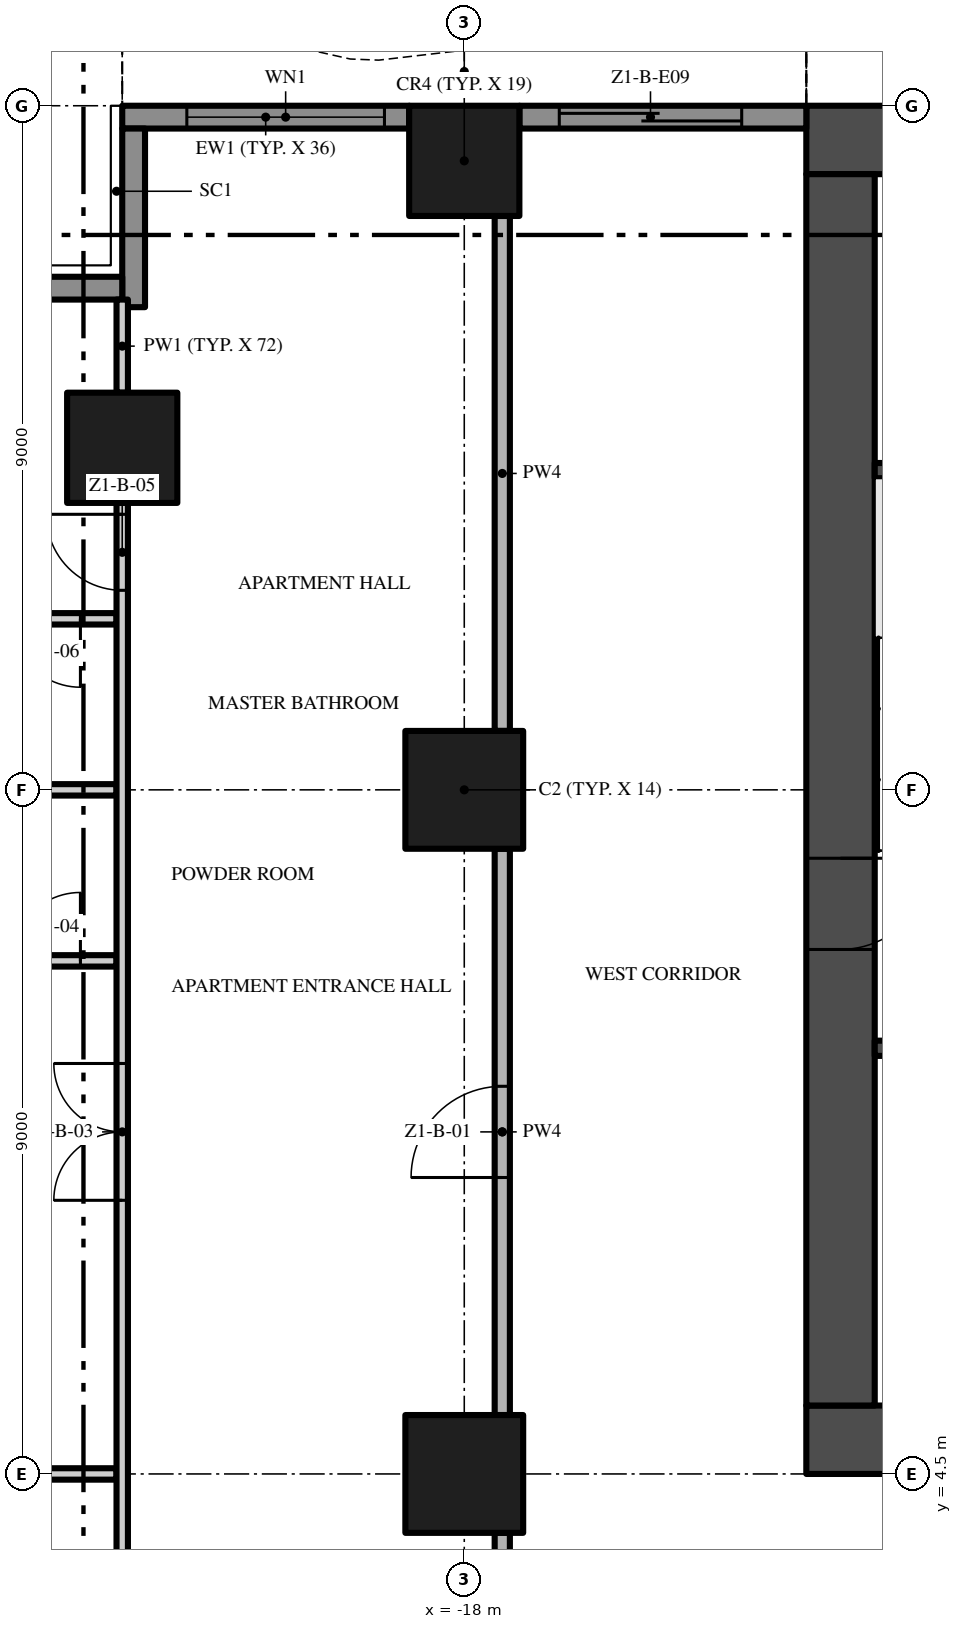
"""IFC4 building model, lengths in metres.
Left out: names, types, materials, properties, quantities, classifications, styles, units other than length and angle.
Written with IfcOpenShell. Run it as: python <this file> out.ifc"""

import sys

from ifc_helpers import new_model, si_unit, direction, frame, frame_2d, origin, origin_2d, place, context, subcontext, project, spatial, polyline, rectangle, outline, extrude, element, fill, save


model = new_model("IFC4")
c1 = context("Model", 3, precision=1e-05, world=origin(), true_north=direction((0.0, 1.0)))
c2 = subcontext(c1, "Body", "Model", "MODEL_VIEW")
j1 = project(units=[si_unit("LENGTHUNIT", "METRE"), si_unit("PLANEANGLEUNIT", "RADIAN")], contexts=[c1])
p1 = place(None, origin())
s1 = spatial("IfcSite", under=j1, at=p1, CompositionType="ELEMENT")
p2 = place(p1, origin())
s2 = spatial("IfcBuilding", under=s1, at=p2, CompositionType="ELEMENT")
p3 = place(p2, frame((0.0, 0.0, 26.4)))
s3 = spatial("IfcBuildingStorey", under=s2, at=p3, CompositionType="ELEMENT", Elevation=26.4)
p4 = place(p3, frame((-13.5, 4.95, -0.3), z_axis=(0.0, 0.0, 1.0), x_axis=(1.0, 0.0, 0.0)))
e1 = element("IfcWall", 1, at=p4, inside=s3, PredefinedType="SHEAR", context=c2, shape_type="SweptSolid", body=[
    extrude(rectangle(XDim=27.0, YDim=0.9, at=frame_2d((13.5, 0.0))), origin(), (0.0, 0.0, 1.0), 3.8),
])
p5 = place(p4, frame((12.0, 0.0, 0.3)))
e2 = element("IfcOpeningElement", 2, at=p5, cuts=e1, PredefinedType="OPENING", context=c2, shape_type="SweptSolid", body=[
    extrude(rectangle(XDim=3.0, YDim=2.4, at=frame_2d((1.5, 1.2))), frame((0.0, 0.46, 0.0), z_axis=(0.0, -1.0, 0.0), x_axis=(1.0, 0.0, 0.0)), (0.0, 0.0, 1.0), 0.92),
])
p6 = place(p4, frame((4.9, 0.0, 0.3)))
e3 = element("IfcOpeningElement", 3, at=p6, cuts=e1, PredefinedType="OPENING", context=c2, shape_type="SweptSolid", body=[
    extrude(rectangle(XDim=1.2, YDim=2.2, at=frame_2d((0.6, 1.1))), frame((0.0, 0.46, 0.0), z_axis=(0.0, -1.0, 0.0), x_axis=(1.0, 0.0, 0.0)), (0.0, 0.0, 1.0), 0.92),
])
p7 = place(p4, frame((20.75, 0.0, 0.3)))
e4 = element("IfcOpeningElement", 4, at=p7, cuts=e1, PredefinedType="OPENING", context=c2, shape_type="SweptSolid", body=[
    extrude(rectangle(XDim=1.5, YDim=2.2, at=frame_2d((0.75, 1.1))), frame((0.0, 0.46, 0.0), z_axis=(0.0, -1.0, 0.0), x_axis=(1.0, 0.0, 0.0)), (0.0, 0.0, 1.0), 0.92),
])
p8 = place(p4, frame((17.4, 0.0, 0.3)))
e5 = element("IfcOpeningElement", 5, at=p8, cuts=e1, PredefinedType="OPENING", context=c2, shape_type="SweptSolid", body=[
    extrude(rectangle(XDim=1.2, YDim=2.2, at=frame_2d((0.6, 1.1))), frame((0.0, 0.46, 0.0), z_axis=(0.0, -1.0, 0.0), x_axis=(1.0, 0.0, 0.0)), (0.0, 0.0, 1.0), 0.92),
])
p9 = place(p3, frame((13.5, 22.05, -0.3), z_axis=(0.0, 0.0, 1.0), x_axis=(-1.0, 0.0, 0.0)))
e6 = element("IfcWall", 6, at=p9, inside=s3, PredefinedType="SHEAR", context=c2, shape_type="SweptSolid", body=[
    extrude(rectangle(XDim=27.0, YDim=0.9, at=frame_2d((13.5, 0.0))), origin(), (0.0, 0.0, 1.0), 3.8),
])
p10 = place(p3, frame((-13.05, 21.6, -0.3), z_axis=(0.0, 0.0, 1.0), x_axis=(0.0, -1.0, 0.0)))
e7 = element("IfcWall", 7, at=p10, inside=s3, PredefinedType="SHEAR", context=c2, shape_type="SweptSolid", body=[
    extrude(rectangle(XDim=16.2, YDim=0.9, at=frame_2d((8.1, 0.0))), origin(), (0.0, 0.0, 1.0), 3.8),
])
p11 = place(p10, frame((9.0, 0.0, 0.3)))
e8 = element("IfcOpeningElement", 8, at=p11, cuts=e7, PredefinedType="OPENING", context=c2, shape_type="SweptSolid", body=[
    extrude(rectangle(XDim=1.2, YDim=2.2, at=frame_2d((0.6, 1.1))), frame((0.0, 0.46, 0.0), z_axis=(0.0, -1.0, 0.0), x_axis=(1.0, 0.0, 0.0)), (0.0, 0.0, 1.0), 0.92),
])
p12 = place(p3, frame((-18.0, 13.5, 0.0), z_axis=(0.0, 0.0, 1.0), x_axis=(1.0, 0.0, 0.0)))
e9 = element("IfcColumn", 9, at=p12, inside=s3, PredefinedType="COLUMN", context=c2, shape_type="SweptSolid", body=[
    extrude(rectangle(XDim=1.55, YDim=1.55, at=origin_2d()), origin(), (0.0, 0.0, 1.0), 3.5),
])
p13 = place(p3, frame((-18.0, 21.775, 0.0), z_axis=(0.0, 0.0, 1.0), x_axis=(1.0, 0.0, 0.0)))
e10 = element("IfcColumn", 10, at=p13, inside=s3, PredefinedType="COLUMN", context=c2, shape_type="SweptSolid", body=[
    extrude(rectangle(XDim=1.45, YDim=1.45, at=origin_2d()), origin(), (0.0, 0.0, 1.0), 3.5),
])
p14 = place(p3, frame((-18.0, 4.5, 0.0), z_axis=(0.0, 0.0, 1.0), x_axis=(1.0, 0.0, 0.0)))
e11 = element("IfcColumn", 11, at=p14, inside=s3, PredefinedType="COLUMN", context=c2, shape_type="SweptSolid", body=[
    extrude(rectangle(XDim=1.55, YDim=1.55, at=origin_2d()), origin(), (0.0, 0.0, 1.0), 3.5),
])
p15 = place(p3, frame((-22.5, 18.0, 0.0), z_axis=(0.0, 0.0, 1.0), x_axis=(1.0, 0.0, 0.0)))
e12 = element("IfcColumn", 12, at=p15, inside=s3, PredefinedType="COLUMN", context=c2, shape_type="SweptSolid", body=[
    extrude(rectangle(XDim=1.45, YDim=1.45, at=origin_2d()), origin(), (0.0, 0.0, 1.0), 3.5),
])
p16 = place(p3, frame((-17.275, 22.35, 0.0), z_axis=(0.0, 0.0, 1.0), x_axis=(1.0, 0.0, 0.0)))
e13 = element("IfcWall", 13, at=p16, inside=s3, PredefinedType="SOLIDWALL", context=c2, shape_type="SweptSolid", body=[
    extrude(rectangle(XDim=3.775, YDim=0.3, at=frame_2d((1.887, 0.0))), origin(), (0.0, 0.0, 1.0), 3.5),
])
p17 = place(p16, frame((0.525, 0.0, 0.0)))
e14 = element("IfcOpeningElement", 14, at=p17, cuts=e13, PredefinedType="OPENING", context=c2, shape_type="SweptSolid", body=[
    extrude(rectangle(XDim=2.4, YDim=2.4, at=frame_2d((1.2, 1.2))), frame((0.0, 0.16, 0.0), z_axis=(0.0, -1.0, 0.0), x_axis=(1.0, 0.0, 0.0)), (0.0, 0.0, 1.0), 0.32),
])
p18 = place(p3, frame((-22.5, 22.35, 0.0), z_axis=(0.0, 0.0, 1.0), x_axis=(1.0, 0.0, 0.0)))
e15 = element("IfcWall", 15, at=p18, inside=s3, PredefinedType="SOLIDWALL", context=c2, shape_type="SweptSolid", body=[
    extrude(rectangle(XDim=3.775, YDim=0.3, at=frame_2d((1.887, 0.0))), origin(), (0.0, 0.0, 1.0), 3.5),
])
p19 = place(p18, frame((0.85, 0.0, 0.45)))
e16 = element("IfcOpeningElement", 16, at=p19, cuts=e15, PredefinedType="OPENING", context=c2, shape_type="SweptSolid", body=[
    extrude(rectangle(XDim=2.6, YDim=2.65, at=frame_2d((1.3, 1.325))), frame((0.0, 0.16, 0.0), z_axis=(0.0, -1.0, 0.0), x_axis=(1.0, 0.0, 0.0)), (0.0, 0.0, 1.0), 0.32),
])
p20 = place(p3, frame((-22.35, 19.85, 0.0), z_axis=(0.0, 0.0, 1.0), x_axis=(0.0, 1.0, 0.0)))
e17 = element("IfcWall", 17, at=p20, inside=s3, PredefinedType="SOLIDWALL", context=c2, shape_type="SweptSolid", body=[
    extrude(rectangle(XDim=2.35, YDim=0.3, at=frame_2d((1.175, 0.0))), origin(), (0.0, 0.0, 1.0), 3.5),
])
p21 = place(p3, frame((-24.75, 20.1, 0.0), z_axis=(0.0, 0.0, 1.0), x_axis=(1.0, 0.0, 0.0)))
e18 = element("IfcWall", 18, at=p21, inside=s3, PredefinedType="SOLIDWALL", context=c2, shape_type="SweptSolid", body=[
    extrude(rectangle(XDim=2.25, YDim=0.3, at=frame_2d((1.125, 0.0))), origin(), (0.0, 0.0, 1.0), 3.5),
])
p22 = place(p3, origin())
e19 = element("IfcWall", 19, at=p22, inside=s3, PredefinedType="USERDEFINED", context=c2, shape_type="SweptSolid", body=[
    extrude(outline(polyline([(-13.5, 25.149), (-15.0, 24.488), (-16.5, 23.755), (-18.0, 23.231), (-19.125, 23.1), (-19.5, 23.115), (-21.0, 23.451), (-22.5, 24.112), (-22.601, 23.883), (-21.079, 23.213), (-19.533, 22.866), (-19.115, 22.849), (-17.944, 22.986), (-16.404, 23.524), (-14.895, 24.261), (-13.399, 24.92), (-13.5, 25.149)])), origin(), (0.0, 0.0, 1.0), 0.9),
])
for number, where, z_axis, x_axis in (
    (20, (-12.6, 10.1, 0.0), (0.0, 0.0, 1.0), (1.0, 0.0, 0.0)),
    (21, (-12.6, 17.7, 0.0), (0.0, 0.0, 1.0), (1.0, 0.0, 0.0)),
):
    element("IfcWall", number, at=place(p3, frame(where, z_axis=z_axis, x_axis=x_axis)), inside=s3, PredefinedType="SHEAR", context=c2, shape_type="SweptSolid", body=[
        extrude(rectangle(XDim=2.95, YDim=0.2, at=frame_2d((1.475, 0.0))), origin(), (0.0, 0.0, 1.0), 3.5),
    ])
p23 = place(p3, frame((-25.55, 4.5, 0.0), z_axis=(0.0, 0.0, 1.0), x_axis=(1.0, 0.0, 0.0)))
e22 = element("IfcWall", 22, at=p23, inside=s3, PredefinedType="PARTITIONING", context=c2, shape_type="SweptSolid", body=[
    extrude(rectangle(XDim=2.975, YDim=0.15, at=frame_2d((1.488, 0.0))), origin(), (0.0, 0.0, 1.0), 3.5),
])
p24 = place(p3, frame((-24.45, 11.25, 0.0), z_axis=(0.0, 0.0, 1.0), x_axis=(1.0, 0.0, 0.0)))
e23 = element("IfcWall", 23, at=p24, inside=s3, PredefinedType="PARTITIONING", context=c2, shape_type="SweptSolid", body=[
    extrude(rectangle(XDim=1.875, YDim=0.15, at=frame_2d((0.938, 0.0))), origin(), (0.0, 0.0, 1.0), 3.5),
])
p25 = place(p24, frame((0.5, 0.0, 0.0)))
e24 = element("IfcOpeningElement", 24, at=p25, cuts=e23, PredefinedType="OPENING", context=c2, shape_type="SweptSolid", body=[
    extrude(rectangle(XDim=0.9, YDim=2.1, at=frame_2d((0.45, 1.05))), frame((0.0, 0.085, 0.0), z_axis=(0.0, -1.0, 0.0), x_axis=(1.0, 0.0, 0.0)), (0.0, 0.0, 1.0), 0.17),
])
p26 = place(p3, frame((-24.45, 13.5, 0.0), z_axis=(0.0, 0.0, 1.0), x_axis=(1.0, 0.0, 0.0)))
e25 = element("IfcWall", 25, at=p26, inside=s3, PredefinedType="PARTITIONING", context=c2, shape_type="SweptSolid", body=[
    extrude(rectangle(XDim=1.875, YDim=0.15, at=frame_2d((0.938, 0.0))), origin(), (0.0, 0.0, 1.0), 3.5),
])
p27 = place(p3, frame((-22.575, 15.75, 0.0), z_axis=(0.0, 0.0, 1.0), x_axis=(-1.0, 0.0, 0.0)))
e26 = element("IfcWall", 26, at=p27, inside=s3, PredefinedType="PARTITIONING", context=c2, shape_type="SweptSolid", body=[
    extrude(rectangle(XDim=1.875, YDim=0.15, at=frame_2d((0.938, 0.0))), origin(), (0.0, 0.0, 1.0), 3.5),
])
p28 = place(p27, frame((0.475, 0.0, 0.0)))
e27 = element("IfcOpeningElement", 27, at=p28, cuts=e26, PredefinedType="OPENING", context=c2, shape_type="SweptSolid", body=[
    extrude(rectangle(XDim=0.9, YDim=2.1, at=frame_2d((0.45, 1.05))), frame((0.0, 0.085, 0.0), z_axis=(0.0, -1.0, 0.0), x_axis=(1.0, 0.0, 0.0)), (0.0, 0.0, 1.0), 0.17),
])
p29 = place(p3, frame((-22.5, 0.1, 0.0), z_axis=(0.0, 0.0, 1.0), x_axis=(0.0, 1.0, 0.0)))
e28 = element("IfcWall", 28, at=p29, inside=s3, PredefinedType="PARTITIONING", context=c2, shape_type="SweptSolid", body=[
    extrude(rectangle(XDim=17.175, YDim=0.15, at=frame_2d((8.588, 0.0))), origin(), (0.0, 0.0, 1.0), 3.5),
])
p30 = place(p29, frame((1.65, 0.0, 0.0)))
e29 = element("IfcOpeningElement", 29, at=p30, cuts=e28, PredefinedType="OPENING", context=c2, shape_type="SweptSolid", body=[
    extrude(rectangle(XDim=1.0, YDim=2.4, at=frame_2d((0.5, 1.2))), frame((0.0, 0.085, 0.0), z_axis=(0.0, -1.0, 0.0), x_axis=(1.0, 0.0, 0.0)), (0.0, 0.0, 1.0), 0.17),
])
p31 = place(p29, frame((8.0, 0.0, 0.0)))
e30 = element("IfcOpeningElement", 30, at=p31, cuts=e28, PredefinedType="OPENING", context=c2, shape_type="SweptSolid", body=[
    extrude(rectangle(XDim=1.8, YDim=2.4, at=frame_2d((0.9, 1.2))), frame((0.0, 0.085, 0.0), z_axis=(0.0, -1.0, 0.0), x_axis=(1.0, 0.0, 0.0)), (0.0, 0.0, 1.0), 0.17),
])
p32 = place(p29, frame((16.025, 0.0, 0.0)))
e31 = element("IfcOpeningElement", 31, at=p32, cuts=e28, PredefinedType="OPENING", context=c2, shape_type="SweptSolid", body=[
    extrude(rectangle(XDim=1.0, YDim=2.4, at=frame_2d((0.5, 1.2))), frame((0.0, 0.085, 0.0), z_axis=(0.0, -1.0, 0.0), x_axis=(1.0, 0.0, 0.0)), (0.0, 0.0, 1.0), 0.17),
])
p33 = place(p3, frame((-22.5, 18.725, 0.0), z_axis=(0.0, 0.0, 1.0), x_axis=(0.0, 1.0, 0.0)))
e32 = element("IfcWall", 32, at=p33, inside=s3, PredefinedType="PARTITIONING", context=c2, shape_type="SweptSolid", body=[
    extrude(rectangle(XDim=1.225, YDim=0.15, at=frame_2d((0.613, 0.0))), origin(), (0.0, 0.0, 1.0), 3.5),
])
p34 = place(p3, frame((-17.5, -0.2, 0.0), z_axis=(0.0, 0.0, 1.0), x_axis=(0.0, 1.0, 0.0)))
e33 = element("IfcWall", 33, at=p34, inside=s3, PredefinedType="PARTITIONING", context=c2, shape_type="SweptSolid", body=[
    extrude(rectangle(XDim=3.925, YDim=0.2, at=frame_2d((1.962, 0.0))), origin(), (0.0, 0.0, 1.0), 3.5),
])
p35 = place(p3, frame((-17.5, 5.275, 0.0), z_axis=(0.0, 0.0, 1.0), x_axis=(0.0, 1.0, 0.0)))
e34 = element("IfcWall", 34, at=p35, inside=s3, PredefinedType="PARTITIONING", context=c2, shape_type="SweptSolid", body=[
    extrude(rectangle(XDim=7.45, YDim=0.2, at=frame_2d((3.725, 0.0))), origin(), (0.0, 0.0, 1.0), 3.5),
])
p36 = place(p35, frame((3.125, 0.0, 0.0)))
e35 = element("IfcOpeningElement", 35, at=p36, cuts=e34, PredefinedType="OPENING", context=c2, shape_type="SweptSolid", body=[
    extrude(rectangle(XDim=1.2, YDim=2.4, at=frame_2d((0.6, 1.2))), frame((0.0, 0.11, 0.0), z_axis=(0.0, -1.0, 0.0), x_axis=(1.0, 0.0, 0.0)), (0.0, 0.0, 1.0), 0.22),
])
p37 = place(p3, frame((-17.5, 14.275, 0.0), z_axis=(0.0, 0.0, 1.0), x_axis=(0.0, 1.0, 0.0)))
e36 = element("IfcWall", 36, at=p37, inside=s3, PredefinedType="PARTITIONING", context=c2, shape_type="SweptSolid", body=[
    extrude(rectangle(XDim=6.775, YDim=0.2, at=frame_2d((3.388, 0.0))), origin(), (0.0, 0.0, 1.0), 3.5),
])
p38 = place(p17, origin())
e37 = element("IfcDoor", 37, at=p38, inside=s3, OperationType="SINGLE_SWING_LEFT", PredefinedType="DOOR", context=c2, shape_type="SweptSolid", body=[
    extrude(rectangle(XDim=2.4, YDim=2.4, at=frame_2d((1.2, 1.2))), frame((0.0, 0.025, 0.0), z_axis=(0.0, -1.0, 0.0), x_axis=(1.0, 0.0, 0.0)), (0.0, 0.0, 1.0), 0.05),
])
fill(e14, e37)
p39 = place(p19, origin())
e38 = element("IfcWindow", 38, at=p39, inside=s3, PartitioningType="SINGLE_PANEL", PredefinedType="WINDOW", context=c2, shape_type="SweptSolid", body=[
    extrude(rectangle(XDim=2.6, YDim=2.65, at=frame_2d((1.3, 1.325))), frame((0.0, 0.03, 0.0), z_axis=(0.0, -1.0, 0.0), x_axis=(1.0, 0.0, 0.0)), (0.0, 0.0, 1.0), 0.06),
])
fill(e16, e38)
p40 = place(p11, frame((1.2, 0.0, 0.0), z_axis=(0.0, 0.0, 1.0), x_axis=(-1.0, 0.0, 0.0)))
e39 = element("IfcDoor", 39, at=p40, inside=s3, OperationType="SINGLE_SWING_RIGHT", PredefinedType="DOOR", context=c2, shape_type="SweptSolid", body=[
    extrude(rectangle(XDim=1.2, YDim=2.2, at=frame_2d((0.6, 1.1))), frame((0.0, 0.025, 0.0), z_axis=(0.0, -1.0, 0.0), x_axis=(1.0, 0.0, 0.0)), (0.0, 0.0, 1.0), 0.05),
])
fill(e8, e39)
p41 = place(p36, origin())
e40 = element("IfcDoor", 40, at=p41, inside=s3, OperationType="SINGLE_SWING_LEFT", PredefinedType="DOOR", context=c2, shape_type="SweptSolid", body=[
    extrude(rectangle(XDim=1.2, YDim=2.4, at=frame_2d((0.6, 1.2))), frame((0.0, 0.025, 0.0), z_axis=(0.0, -1.0, 0.0), x_axis=(1.0, 0.0, 0.0)), (0.0, 0.0, 1.0), 0.05),
])
fill(e35, e40)
p42 = place(p31, origin())
e41 = element("IfcDoor", 41, at=p42, inside=s3, OperationType="DOUBLE_DOOR_SINGLE_SWING", PredefinedType="DOOR", context=c2, shape_type="SweptSolid", body=[
    extrude(rectangle(XDim=1.8, YDim=2.4, at=frame_2d((0.9, 1.2))), frame((0.0, 0.025, 0.0), z_axis=(0.0, -1.0, 0.0), x_axis=(1.0, 0.0, 0.0)), (0.0, 0.0, 1.0), 0.05),
])
fill(e30, e41)
p43 = place(p25, origin())
e42 = element("IfcDoor", 42, at=p43, inside=s3, OperationType="SINGLE_SWING_RIGHT", PredefinedType="DOOR", context=c2, shape_type="SweptSolid", body=[
    extrude(rectangle(XDim=0.9, YDim=2.1, at=frame_2d((0.45, 1.05))), frame((0.0, 0.025, 0.0), z_axis=(0.0, -1.0, 0.0), x_axis=(1.0, 0.0, 0.0)), (0.0, 0.0, 1.0), 0.05),
])
fill(e24, e42)
p44 = place(p32, origin())
e43 = element("IfcDoor", 43, at=p44, inside=s3, OperationType="SINGLE_SWING_RIGHT", PredefinedType="DOOR", context=c2, shape_type="SweptSolid", body=[
    extrude(rectangle(XDim=1.0, YDim=2.4, at=frame_2d((0.5, 1.2))), frame((0.0, 0.025, 0.0), z_axis=(0.0, -1.0, 0.0), x_axis=(1.0, 0.0, 0.0)), (0.0, 0.0, 1.0), 0.05),
])
fill(e31, e43)
p45 = place(p28, origin())
e44 = element("IfcDoor", 44, at=p45, inside=s3, OperationType="SINGLE_SWING_LEFT", PredefinedType="DOOR", context=c2, shape_type="SweptSolid", body=[
    extrude(rectangle(XDim=0.9, YDim=2.1, at=frame_2d((0.45, 1.05))), frame((0.0, 0.025, 0.0), z_axis=(0.0, -1.0, 0.0), x_axis=(1.0, 0.0, 0.0)), (0.0, 0.0, 1.0), 0.05),
])
fill(e27, e44)
save(model, sys.argv[1])
